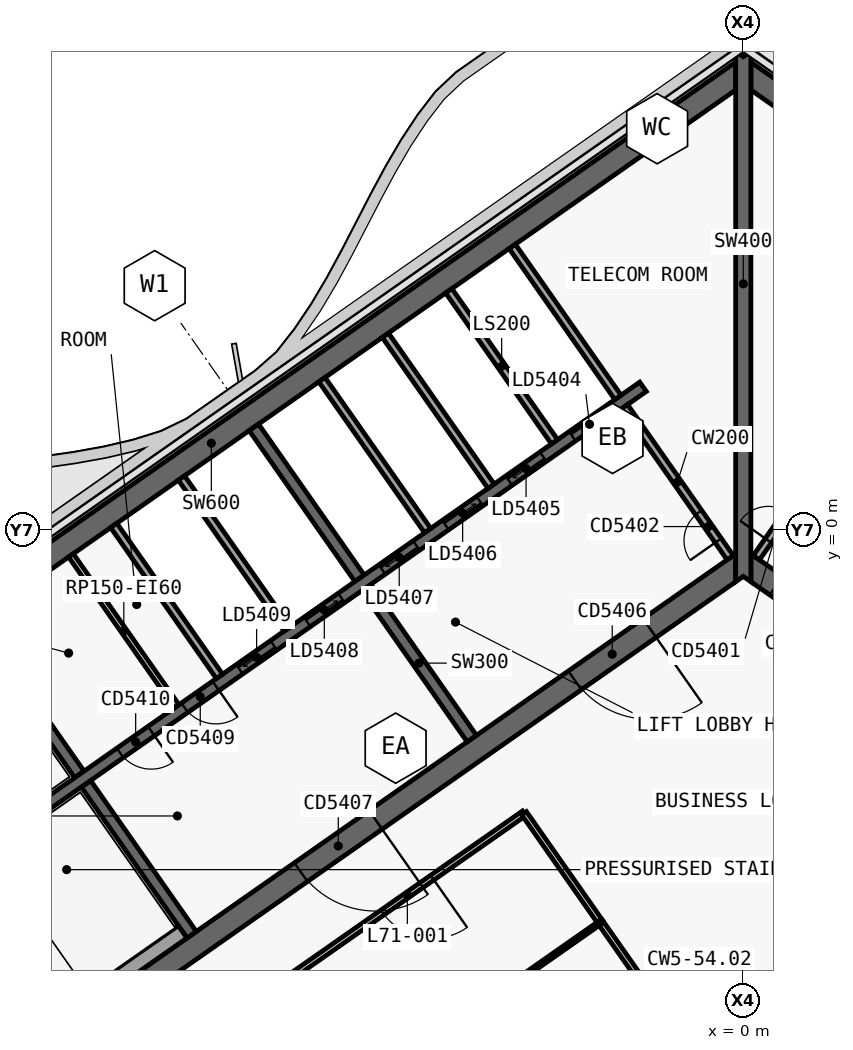
"""IFC4 building model, lengths in metres.
Left out: names, types, materials, properties, quantities, classifications, styles, units other than length and angle.
Written with IfcOpenShell. Run it as: python <this file> out.ifc"""

import sys

from ifc_helpers import new_model, si_unit, direction, frame, frame_2d, origin, place, context, subcontext, project, spatial, polyline, rectangle, outline, extrude, element, fill, save


model = new_model("IFC4")
c1 = context("Model", 3, precision=1e-05, world=origin(), true_north=direction((0.0, 1.0)))
c2 = subcontext(c1, "Body", "Model", "MODEL_VIEW")
j1 = project(units=[si_unit("LENGTHUNIT", "METRE"), si_unit("PLANEANGLEUNIT", "RADIAN")], contexts=[c1])
p1 = place(None, origin())
s1 = spatial("IfcSite", under=j1, at=p1, CompositionType="ELEMENT")
p2 = place(p1, origin())
s2 = spatial("IfcBuilding", under=s1, at=p2, CompositionType="ELEMENT")
p3 = place(p2, frame((0.0, 0.0, 299.5)))
s3 = spatial("IfcBuildingStorey", under=s2, at=p3, CompositionType="ELEMENT", Elevation=299.5)
p4 = place(p3, frame((-0.028, 12.066, 0.0), z_axis=(0.0, 0.0, 1.0), x_axis=(-0.819151382952, -0.573577380837, 0.0)))
e1 = element("IfcWall", 1, at=p4, inside=s3, PredefinedType="SHEAR", context=c2, shape_type="SweptSolid", body=[
    extrude(outline(polyline([(33.898, 0.3), (0.42, 0.3), (0.0, -0.3), (33.898, -0.3), (33.898, 0.3)])), origin(), (0.0, 0.0, 1.0), 3.9),
])
p5 = place(p3, frame((-0.028, -0.874, 0.0), z_axis=(0.0, 0.0, 1.0), x_axis=(-0.819150035022, -0.573579305871, 0.0)))
e2 = element("IfcWall", 2, at=p5, inside=s3, PredefinedType="SHEAR", context=c2, shape_type="SweptSolid", body=[
    extrude(outline(polyline([(26.476, 0.3), (0.42, 0.3), (0.0, -0.3), (26.476, -0.3), (26.476, 0.3)])), origin(), (0.0, 0.0, 1.0), 3.9),
])
p6 = place(p5, frame((2.976, 0.0, 0.0)))
e3 = element("IfcOpeningElement", 3, at=p6, cuts=e2, PredefinedType="OPENING", context=c2, shape_type="SweptSolid", body=[
    extrude(rectangle(XDim=2.4, YDim=2.1, at=frame_2d((1.2, 1.05))), frame((0.0, 0.31, 0.0), z_axis=(0.0, -1.0, 0.0), x_axis=(1.0, 0.0, 0.0)), (0.0, 0.0, 1.0), 0.62),
])
p7 = place(p5, frame((11.776, 0.0, 0.0)))
e4 = element("IfcOpeningElement", 4, at=p7, cuts=e2, PredefinedType="OPENING", context=c2, shape_type="SweptSolid", body=[
    extrude(rectangle(XDim=2.4, YDim=2.1, at=frame_2d((1.2, 1.05))), frame((0.0, 0.31, 0.0), z_axis=(0.0, -1.0, 0.0), x_axis=(1.0, 0.0, 0.0)), (0.0, 0.0, 1.0), 0.62),
])
p8 = place(p3, frame((-7.143, -5.49, 0.0), z_axis=(0.0, 0.0, 1.0), x_axis=(-0.573617744349, 0.819123118565, 0.0)))
e5 = element("IfcWall", 5, at=p8, inside=s3, PredefinedType="SHEAR", context=c2, shape_type="SweptSolid", body=[
    extrude(outline(polyline([(4.85, 0.15), (0.0, 0.15), (0.0, -0.15), (4.85, -0.15), (4.85, 0.15)])), origin(), (0.0, 0.0, 1.0), 3.9),
])
p9 = place(p3, frame((-10.097, -1.271, 0.0), z_axis=(0.0, 0.0, 1.0), x_axis=(-0.573560315113, 0.819163332265, 0.0)))
e6 = element("IfcWall", 6, at=p9, inside=s3, PredefinedType="SHEAR", context=c2, shape_type="SweptSolid", body=[
    extrude(outline(polyline([(4.85, -0.15), (4.85, 0.15), (0.0, 0.15), (0.0, -0.15), (4.85, -0.15)])), origin(), (0.0, 0.0, 1.0), 3.9),
])
p10 = place(p3, frame((-14.515, -10.652, 0.0), z_axis=(0.0, 0.0, 1.0), x_axis=(-0.573560315113, 0.819163332265, 0.0)))
e7 = element("IfcWall", 7, at=p10, inside=s3, PredefinedType="SHEAR", context=c2, shape_type="SweptSolid", body=[
    extrude(outline(polyline([(4.85, 0.15), (0.0, 0.15), (0.0, -0.15), (4.85, -0.15), (4.85, 0.15)])), origin(), (0.0, 0.0, 1.0), 3.9),
])
p11 = place(p3, frame((-17.469, -6.433, 0.0), z_axis=(0.0, 0.0, 1.0), x_axis=(-0.573594092424, 0.81913968109, 0.0)))
e8 = element("IfcWall", 8, at=p11, inside=s3, PredefinedType="SHEAR", context=c2, shape_type="SweptSolid", body=[
    extrude(outline(polyline([(4.85, -0.15), (4.85, 0.15), (0.0, 0.15), (0.0, -0.15), (4.85, -0.15)])), origin(), (0.0, 0.0, 1.0), 3.9),
])
p12 = place(p3, frame((-2.638, 3.768, 0.0), z_axis=(0.0, 0.0, 1.0), x_axis=(-0.819155014212, -0.573572194837, 0.0)))
e9 = element("IfcWall", 9, at=p12, inside=s3, PredefinedType="SHEAR", context=c2, shape_type="SweptSolid", body=[
    extrude(outline(polyline([(26.4, 0.15), (0.0, 0.15), (0.0, -0.15), (26.4, -0.15), (26.4, 0.15)])), origin(), (0.0, 0.0, 1.0), 3.9),
])
p13 = place(p12, frame((1.169, 0.0, 0.0)))
e10 = element("IfcOpeningElement", 10, at=p13, cuts=e9, PredefinedType="OPENING", context=c2, shape_type="SweptSolid", body=[
    extrude(rectangle(XDim=1.1, YDim=2.1, at=frame_2d((0.55, 1.05))), frame((0.0, 0.16, 0.0), z_axis=(0.0, -1.0, 0.0), x_axis=(1.0, 0.0, 0.0)), (0.0, 0.0, 1.0), 0.32),
])
p14 = place(p12, frame((3.206, 0.0, 0.0)))
e11 = element("IfcOpeningElement", 11, at=p14, cuts=e9, PredefinedType="OPENING", context=c2, shape_type="SweptSolid", body=[
    extrude(rectangle(XDim=1.1, YDim=2.1, at=frame_2d((0.55, 1.05))), frame((0.0, 0.16, 0.0), z_axis=(0.0, -1.0, 0.0), x_axis=(1.0, 0.0, 0.0)), (0.0, 0.0, 1.0), 0.32),
])
p15 = place(p12, frame((5.244, 0.0, 0.0)))
e12 = element("IfcOpeningElement", 12, at=p15, cuts=e9, PredefinedType="OPENING", context=c2, shape_type="SweptSolid", body=[
    extrude(rectangle(XDim=1.1, YDim=2.1, at=frame_2d((0.55, 1.05))), frame((0.0, 0.16, 0.0), z_axis=(0.0, -1.0, 0.0), x_axis=(1.0, 0.0, 0.0)), (0.0, 0.0, 1.0), 0.32),
])
p16 = place(p12, frame((7.281, 0.0, 0.0)))
e13 = element("IfcOpeningElement", 13, at=p16, cuts=e9, PredefinedType="OPENING", context=c2, shape_type="SweptSolid", body=[
    extrude(rectangle(XDim=1.1, YDim=2.1, at=frame_2d((0.55, 1.05))), frame((0.0, 0.16, 0.0), z_axis=(0.0, -1.0, 0.0), x_axis=(1.0, 0.0, 0.0)), (0.0, 0.0, 1.0), 0.32),
])
p17 = place(p12, frame((9.688, 0.0, 0.0)))
e14 = element("IfcOpeningElement", 14, at=p17, cuts=e9, PredefinedType="OPENING", context=c2, shape_type="SweptSolid", body=[
    extrude(rectangle(XDim=1.1, YDim=2.1, at=frame_2d((0.55, 1.05))), frame((0.0, 0.16, 0.0), z_axis=(0.0, -1.0, 0.0), x_axis=(1.0, 0.0, 0.0)), (0.0, 0.0, 1.0), 0.32),
])
p18 = place(p12, frame((11.863, 0.0, 0.0)))
e15 = element("IfcOpeningElement", 15, at=p18, cuts=e9, PredefinedType="OPENING", context=c2, shape_type="SweptSolid", body=[
    extrude(rectangle(XDim=1.1, YDim=2.1, at=frame_2d((0.55, 1.05))), frame((0.0, 0.16, 0.0), z_axis=(0.0, -1.0, 0.0), x_axis=(1.0, 0.0, 0.0)), (0.0, 0.0, 1.0), 0.32),
])
p19 = place(p12, frame((13.722, 0.0, 0.0)))
e16 = element("IfcOpeningElement", 16, at=p19, cuts=e9, PredefinedType="OPENING", context=c2, shape_type="SweptSolid", body=[
    extrude(rectangle(XDim=1.0, YDim=2.1, at=frame_2d((0.5, 1.05))), frame((0.0, 0.16, 0.0), z_axis=(0.0, -1.0, 0.0), x_axis=(1.0, 0.0, 0.0)), (0.0, 0.0, 1.0), 0.32),
])
p20 = place(p12, frame((15.798, 0.0, 0.0)))
e17 = element("IfcOpeningElement", 17, at=p20, cuts=e9, PredefinedType="OPENING", context=c2, shape_type="SweptSolid", body=[
    extrude(rectangle(XDim=1.0, YDim=2.1, at=frame_2d((0.5, 1.05))), frame((0.0, 0.16, 0.0), z_axis=(0.0, -1.0, 0.0), x_axis=(1.0, 0.0, 0.0)), (0.0, 0.0, 1.0), 0.32),
])
p21 = place(p3, frame((0.028, 12.066, 0.0), z_axis=(0.0, 0.0, 1.0), x_axis=(0.819151382952, -0.573577380837, 0.0)))
e18 = element("IfcWall", 18, at=p21, inside=s3, PredefinedType="SHEAR", context=c2, shape_type="SweptSolid", body=[
    extrude(outline(polyline([(33.898, 0.3), (0.0, 0.3), (0.42, -0.3), (33.898, -0.3), (33.898, 0.3)])), origin(), (0.0, 0.0, 1.0), 3.9),
])
p22 = place(p3, frame((0.028, -0.874, 0.0), z_axis=(0.0, 0.0, 1.0), x_axis=(0.819150035022, -0.573579305871, 0.0)))
e19 = element("IfcWall", 19, at=p22, inside=s3, PredefinedType="SHEAR", context=c2, shape_type="SweptSolid", body=[
    extrude(outline(polyline([(26.476, 0.3), (0.0, 0.3), (0.42, -0.3), (26.476, -0.3), (26.476, 0.3)])), origin(), (0.0, 0.0, 1.0), 3.9),
])
p23 = place(p22, frame((1.026, 0.0, 0.0)))
e20 = element("IfcOpeningElement", 20, at=p23, cuts=e19, PredefinedType="OPENING", context=c2, shape_type="SweptSolid", body=[
    extrude(rectangle(XDim=1.5, YDim=2.1, at=frame_2d((0.75, 1.05))), frame((0.0, 0.31, 0.0), z_axis=(0.0, -1.0, 0.0), x_axis=(1.0, 0.0, 0.0)), (0.0, 0.0, 1.0), 0.62),
])
p24 = place(p22, frame((12.226, 0.0, 0.0)))
e21 = element("IfcOpeningElement", 21, at=p24, cuts=e19, PredefinedType="OPENING", context=c2, shape_type="SweptSolid", body=[
    extrude(rectangle(XDim=1.5, YDim=2.1, at=frame_2d((0.75, 1.05))), frame((0.0, 0.31, 0.0), z_axis=(0.0, -1.0, 0.0), x_axis=(1.0, 0.0, 0.0)), (0.0, 0.0, 1.0), 0.62),
])
p25 = place(p3, frame((0.0, -1.361, 0.0), z_axis=(0.0, 0.0, 1.0), x_axis=(0.0, 1.0, 0.0)))
e22 = element("IfcWall", 22, at=p25, inside=s3, PredefinedType="SHEAR", context=c2, shape_type="SweptSolid", body=[
    extrude(outline(polyline([(0.14, 0.2), (0.0, 0.2), (0.14, 0.0), (0.0, -0.2), (0.14, -0.2), (1.012, -0.2), (12.94, -0.2), (13.813, -0.2), (13.893, -0.2), (13.933, -0.172), (13.813, 0.0), (13.933, 0.172), (13.893, 0.2), (13.813, 0.2), (12.94, 0.2), (1.012, 0.2), (0.14, 0.2)])), origin(), (0.0, 0.0, 1.0), 3.9),
])
p26 = place(p3, frame((-4.967, 2.321, 0.0), z_axis=(0.0, 0.0, 1.0), x_axis=(-0.573594092424, 0.81913968109, 0.0)))
e23 = element("IfcWall", 23, at=p26, inside=s3, PredefinedType="SOLIDWALL", context=c2, shape_type="SweptSolid", body=[
    extrude(rectangle(XDim=4.85, YDim=0.2, at=frame_2d((2.425, 0.0))), origin(), (0.0, 0.0, 1.0), 3.9),
])
p27 = place(p3, frame((-6.636, 1.152, 0.0), z_axis=(0.0, 0.0, 1.0), x_axis=(-0.573560315113, 0.819163332265, 0.0)))
e24 = element("IfcWall", 24, at=p27, inside=s3, PredefinedType="SOLIDWALL", context=c2, shape_type="SweptSolid", body=[
    extrude(rectangle(XDim=4.85, YDim=0.2, at=frame_2d((2.425, 0.0))), origin(), (0.0, 0.0, 1.0), 3.9),
])
p28 = place(p3, frame((-8.305, -0.017, 0.0), z_axis=(0.0, 0.0, 1.0), x_axis=(-0.573594092424, 0.81913968109, 0.0)))
e25 = element("IfcWall", 25, at=p28, inside=s3, PredefinedType="SOLIDWALL", context=c2, shape_type="SweptSolid", body=[
    extrude(rectangle(XDim=4.85, YDim=0.2, at=frame_2d((2.425, 0.0))), origin(), (0.0, 0.0, 1.0), 3.9),
])
p29 = place(p3, frame((-14.909, -4.641, 0.0), z_axis=(0.0, 0.0, 1.0), x_axis=(-0.573560315113, 0.819163332265, 0.0)))
e26 = element("IfcWall", 26, at=p29, inside=s3, PredefinedType="PARTITIONING", context=c2, shape_type="SweptSolid", body=[
    extrude(rectangle(XDim=4.85, YDim=0.15, at=frame_2d((2.425, 0.0))), origin(), (0.0, 0.0, 1.0), 3.62),
])
p30 = place(p3, frame((-12.001, -2.605, 0.0), z_axis=(0.0, 0.0, 1.0), x_axis=(-0.573560315113, 0.819163332265, 0.0)))
e27 = element("IfcWall", 27, at=p30, inside=s3, PredefinedType="SOLIDWALL", context=c2, shape_type="SweptSolid", body=[
    extrude(rectangle(XDim=4.85, YDim=0.2, at=frame_2d((2.425, 0.0))), origin(), (0.0, 0.0, 1.0), 3.9),
])
p31 = place(p3, frame((-13.783, -3.852, 0.0), z_axis=(0.0, 0.0, 1.0), x_axis=(-0.573594092424, 0.81913968109, 0.0)))
e28 = element("IfcWall", 28, at=p31, inside=s3, PredefinedType="SOLIDWALL", context=c2, shape_type="SweptSolid", body=[
    extrude(rectangle(XDim=4.85, YDim=0.2, at=frame_2d((2.425, 0.0))), origin(), (0.0, 0.0, 1.0), 3.9),
])
p32 = place(p3, frame((-14.753, -10.574, 0.0), z_axis=(0.0, 0.0, 1.0), x_axis=(-0.819158229677, -0.573567602601, 0.0)))
e29 = element("IfcWall", 29, at=p32, inside=s3, PredefinedType="SOLIDWALL", context=c2, shape_type="SweptSolid", body=[
    extrude(rectangle(XDim=8.25, YDim=0.4, at=frame_2d((4.125, 0.0))), origin(), (0.0, 0.0, 1.0), 3.62),
])
p33 = place(p3, frame((-0.344, -0.729, 0.0), z_axis=(0.0, 0.0, 1.0), x_axis=(-0.573560315113, 0.819163332265, 0.0)))
e30 = element("IfcWall", 30, at=p33, inside=s3, PredefinedType="SOLIDWALL", context=c2, shape_type="SweptSolid", body=[
    extrude(rectangle(XDim=4.85, YDim=0.2, at=frame_2d((2.425, 0.0))), origin(), (0.0, 0.0, 1.0), 3.62),
])
p34 = place(p33, frame((0.55, 0.0, 0.0)))
e31 = element("IfcOpeningElement", 31, at=p34, cuts=e30, PredefinedType="OPENING", context=c2, shape_type="SweptSolid", body=[
    extrude(rectangle(XDim=0.9, YDim=2.1, at=frame_2d((0.45, 1.05))), frame((0.0, 0.11, 0.0), z_axis=(0.0, -1.0, 0.0), x_axis=(1.0, 0.0, 0.0)), (0.0, 0.0, 1.0), 0.22),
])
p35 = place(p3, frame((-3.298, 3.49, 0.0), z_axis=(0.0, 0.0, 1.0), x_axis=(-0.573560315113, 0.819163332265, 0.0)))
e32 = element("IfcWall", 32, at=p35, inside=s3, PredefinedType="SOLIDWALL", context=c2, shape_type="SweptSolid", body=[
    extrude(rectangle(XDim=4.85, YDim=0.2, at=frame_2d((2.425, 0.0))), origin(), (0.0, 0.0, 1.0), 3.62),
])
p36 = place(p3, frame((0.344, -0.729, 0.0), z_axis=(0.0, 0.0, 1.0), x_axis=(0.573560315113, 0.819163332265, 0.0)))
e33 = element("IfcWall", 33, at=p36, inside=s3, PredefinedType="SOLIDWALL", context=c2, shape_type="SweptSolid", body=[
    extrude(rectangle(XDim=4.85, YDim=0.2, at=frame_2d((2.425, 0.0))), origin(), (0.0, 0.0, 1.0), 3.62),
])
p37 = place(p36, frame((0.55, 0.0, 0.0)))
e34 = element("IfcOpeningElement", 34, at=p37, cuts=e33, PredefinedType="OPENING", context=c2, shape_type="SweptSolid", body=[
    extrude(rectangle(XDim=0.9, YDim=2.1, at=frame_2d((0.45, 1.05))), frame((0.0, 0.11, 0.0), z_axis=(0.0, -1.0, 0.0), x_axis=(1.0, 0.0, 0.0)), (0.0, 0.0, 1.0), 0.22),
])
p38 = place(p3, frame((-5.766, -7.456, 0.0), z_axis=(0.0, 0.0, 1.0), x_axis=(-0.819150881364, -0.573578097177, 0.0)))
e35 = element("IfcWall", 35, at=p38, inside=s3, PredefinedType="PARTITIONING", context=c2, shape_type="SweptSolid", body=[
    extrude(rectangle(XDim=7.502, YDim=0.15, at=frame_2d((3.751, 0.0))), origin(), (0.0, 0.0, 1.0), 3.05),
])
p39 = place(p38, frame((2.951, 0.0, 0.0)))
e36 = element("IfcOpeningElement", 36, at=p39, cuts=e35, PredefinedType="OPENING", context=c2, shape_type="SweptSolid", body=[
    extrude(rectangle(XDim=1.6, YDim=2.1, at=frame_2d((0.8, 1.05))), frame((0.0, 0.085, 0.0), z_axis=(0.0, -1.0, 0.0), x_axis=(1.0, 0.0, 0.0)), (0.0, 0.0, 1.0), 0.17),
])
p40 = place(p3, frame((-1.849, -13.051, 0.0), z_axis=(0.0, 0.0, 1.0), x_axis=(-0.573600070244, 0.819135495151, 0.0)))
e37 = element("IfcWall", 37, at=p40, inside=s3, PredefinedType="PARTITIONING", context=c2, shape_type="SweptSolid", body=[
    extrude(rectangle(XDim=3.331, YDim=0.15, at=frame_2d((1.666, 0.0))), origin(), (0.0, 0.0, 1.0), 3.05),
])
p41 = place(p3, frame((-3.758, -10.324, 0.0), z_axis=(0.0, 0.0, 1.0), x_axis=(-0.573560539213, 0.819163175355, 0.0)))
e38 = element("IfcWall", 38, at=p41, inside=s3, PredefinedType="PARTITIONING", context=c2, shape_type="SweptSolid", body=[
    extrude(rectangle(XDim=3.504, YDim=0.15, at=frame_2d((1.752, 0.0))), origin(), (0.0, 0.0, 1.0), 3.05),
])
p42 = place(p3, frame((-3.758, -10.324, 0.0), z_axis=(0.0, 0.0, 1.0), x_axis=(-0.81915238829, -0.573575945067, 0.0)))
e39 = element("IfcWall", 39, at=p42, inside=s3, PredefinedType="PARTITIONING", context=c2, shape_type="SweptSolid", body=[
    extrude(rectangle(XDim=7.5, YDim=0.1, at=frame_2d((3.75, 0.0))), origin(), (0.0, 0.0, 1.0), 3.05),
])
p43 = place(p42, frame((3.3, 0.0, 0.0)))
e40 = element("IfcOpeningElement", 40, at=p43, cuts=e39, PredefinedType="OPENING", context=c2, shape_type="SweptSolid", body=[
    extrude(rectangle(XDim=0.9, YDim=2.1, at=frame_2d((0.45, 1.05))), frame((0.0, 0.06, 0.0), z_axis=(0.0, -1.0, 0.0), x_axis=(1.0, 0.0, 0.0)), (0.0, 0.0, 1.0), 0.12),
])
p44 = place(p13, origin())
e41 = element("IfcDoor", 41, at=p44, inside=s3, OperationType="SLIDING_TO_LEFT", PredefinedType="DOOR", context=c2, shape_type="SweptSolid", body=[
    extrude(rectangle(XDim=1.1, YDim=2.1, at=frame_2d((0.55, 1.05))), frame((0.0, 0.025, 0.0), z_axis=(0.0, -1.0, 0.0), x_axis=(1.0, 0.0, 0.0)), (0.0, 0.0, 1.0), 0.05),
])
fill(e10, e41)
p45 = place(p14, origin())
e42 = element("IfcDoor", 42, at=p45, inside=s3, OperationType="SLIDING_TO_RIGHT", PredefinedType="DOOR", context=c2, shape_type="SweptSolid", body=[
    extrude(rectangle(XDim=1.1, YDim=2.1, at=frame_2d((0.55, 1.05))), frame((0.0, 0.025, 0.0), z_axis=(0.0, -1.0, 0.0), x_axis=(1.0, 0.0, 0.0)), (0.0, 0.0, 1.0), 0.05),
])
fill(e11, e42)
p46 = place(p15, origin())
e43 = element("IfcDoor", 43, at=p46, inside=s3, OperationType="SLIDING_TO_LEFT", PredefinedType="DOOR", context=c2, shape_type="SweptSolid", body=[
    extrude(rectangle(XDim=1.1, YDim=2.1, at=frame_2d((0.55, 1.05))), frame((0.0, 0.025, 0.0), z_axis=(0.0, -1.0, 0.0), x_axis=(1.0, 0.0, 0.0)), (0.0, 0.0, 1.0), 0.05),
])
fill(e12, e43)
p47 = place(p16, origin())
e44 = element("IfcDoor", 44, at=p47, inside=s3, OperationType="SLIDING_TO_RIGHT", PredefinedType="DOOR", context=c2, shape_type="SweptSolid", body=[
    extrude(rectangle(XDim=1.1, YDim=2.1, at=frame_2d((0.55, 1.05))), frame((0.0, 0.025, 0.0), z_axis=(0.0, -1.0, 0.0), x_axis=(1.0, 0.0, 0.0)), (0.0, 0.0, 1.0), 0.05),
])
fill(e13, e44)
p48 = place(p17, origin())
e45 = element("IfcDoor", 45, at=p48, inside=s3, OperationType="SLIDING_TO_LEFT", PredefinedType="DOOR", context=c2, shape_type="SweptSolid", body=[
    extrude(rectangle(XDim=1.1, YDim=2.1, at=frame_2d((0.55, 1.05))), frame((0.0, 0.025, 0.0), z_axis=(0.0, -1.0, 0.0), x_axis=(1.0, 0.0, 0.0)), (0.0, 0.0, 1.0), 0.05),
])
fill(e14, e45)
p49 = place(p18, origin())
e46 = element("IfcDoor", 46, at=p49, inside=s3, OperationType="SLIDING_TO_RIGHT", PredefinedType="DOOR", context=c2, shape_type="SweptSolid", body=[
    extrude(rectangle(XDim=1.1, YDim=2.1, at=frame_2d((0.55, 1.05))), frame((0.0, 0.025, 0.0), z_axis=(0.0, -1.0, 0.0), x_axis=(1.0, 0.0, 0.0)), (0.0, 0.0, 1.0), 0.05),
])
fill(e15, e46)
p50 = place(p19, origin())
e47 = element("IfcDoor", 47, at=p50, inside=s3, OperationType="SINGLE_SWING_RIGHT", PredefinedType="DOOR", context=c2, shape_type="SweptSolid", body=[
    extrude(rectangle(XDim=1.0, YDim=2.1, at=frame_2d((0.5, 1.05))), frame((0.0, 0.025, 0.0), z_axis=(0.0, -1.0, 0.0), x_axis=(1.0, 0.0, 0.0)), (0.0, 0.0, 1.0), 0.05),
])
fill(e16, e47)
p51 = place(p20, origin())
e48 = element("IfcDoor", 48, at=p51, inside=s3, OperationType="SINGLE_SWING_RIGHT", PredefinedType="DOOR", context=c2, shape_type="SweptSolid", body=[
    extrude(rectangle(XDim=1.0, YDim=2.1, at=frame_2d((0.5, 1.05))), frame((0.0, 0.025, 0.0), z_axis=(0.0, -1.0, 0.0), x_axis=(1.0, 0.0, 0.0)), (0.0, 0.0, 1.0), 0.05),
])
fill(e17, e48)
p52 = place(p6, origin())
e49 = element("IfcDoor", 49, at=p52, inside=s3, OperationType="DOUBLE_DOOR_SINGLE_SWING", PredefinedType="DOOR", context=c2, shape_type="SweptSolid", body=[
    extrude(rectangle(XDim=2.4, YDim=2.1, at=frame_2d((1.2, 1.05))), frame((0.0, 0.025, 0.0), z_axis=(0.0, -1.0, 0.0), x_axis=(1.0, 0.0, 0.0)), (0.0, 0.0, 1.0), 0.05),
])
fill(e3, e49)
p53 = place(p7, origin())
e50 = element("IfcDoor", 50, at=p53, inside=s3, OperationType="DOUBLE_DOOR_SINGLE_SWING", PredefinedType="DOOR", context=c2, shape_type="SweptSolid", body=[
    extrude(rectangle(XDim=2.4, YDim=2.1, at=frame_2d((1.2, 1.05))), frame((0.0, 0.025, 0.0), z_axis=(0.0, -1.0, 0.0), x_axis=(1.0, 0.0, 0.0)), (0.0, 0.0, 1.0), 0.05),
])
fill(e4, e50)
p54 = place(p34, origin())
e51 = element("IfcDoor", 51, at=p54, inside=s3, OperationType="SINGLE_SWING_RIGHT", PredefinedType="DOOR", context=c2, shape_type="SweptSolid", body=[
    extrude(rectangle(XDim=0.9, YDim=2.1, at=frame_2d((0.45, 1.05))), frame((0.0, 0.025, 0.0), z_axis=(0.0, -1.0, 0.0), x_axis=(1.0, 0.0, 0.0)), (0.0, 0.0, 1.0), 0.05),
])
fill(e31, e51)
p55 = place(p37, origin())
e52 = element("IfcDoor", 52, at=p55, inside=s3, OperationType="SINGLE_SWING_RIGHT", PredefinedType="DOOR", context=c2, shape_type="SweptSolid", body=[
    extrude(rectangle(XDim=0.9, YDim=2.1, at=frame_2d((0.45, 1.05))), frame((0.0, 0.025, 0.0), z_axis=(0.0, -1.0, 0.0), x_axis=(1.0, 0.0, 0.0)), (0.0, 0.0, 1.0), 0.05),
])
fill(e34, e52)
p56 = place(p39, origin())
e53 = element("IfcDoor", 53, at=p56, inside=s3, OperationType="DOUBLE_DOOR_SINGLE_SWING", PredefinedType="DOOR", context=c2, shape_type="SweptSolid", body=[
    extrude(rectangle(XDim=1.6, YDim=2.1, at=frame_2d((0.8, 1.05))), frame((0.0, 0.025, 0.0), z_axis=(0.0, -1.0, 0.0), x_axis=(1.0, 0.0, 0.0)), (0.0, 0.0, 1.0), 0.05),
])
fill(e36, e53)
save(model, sys.argv[1])
